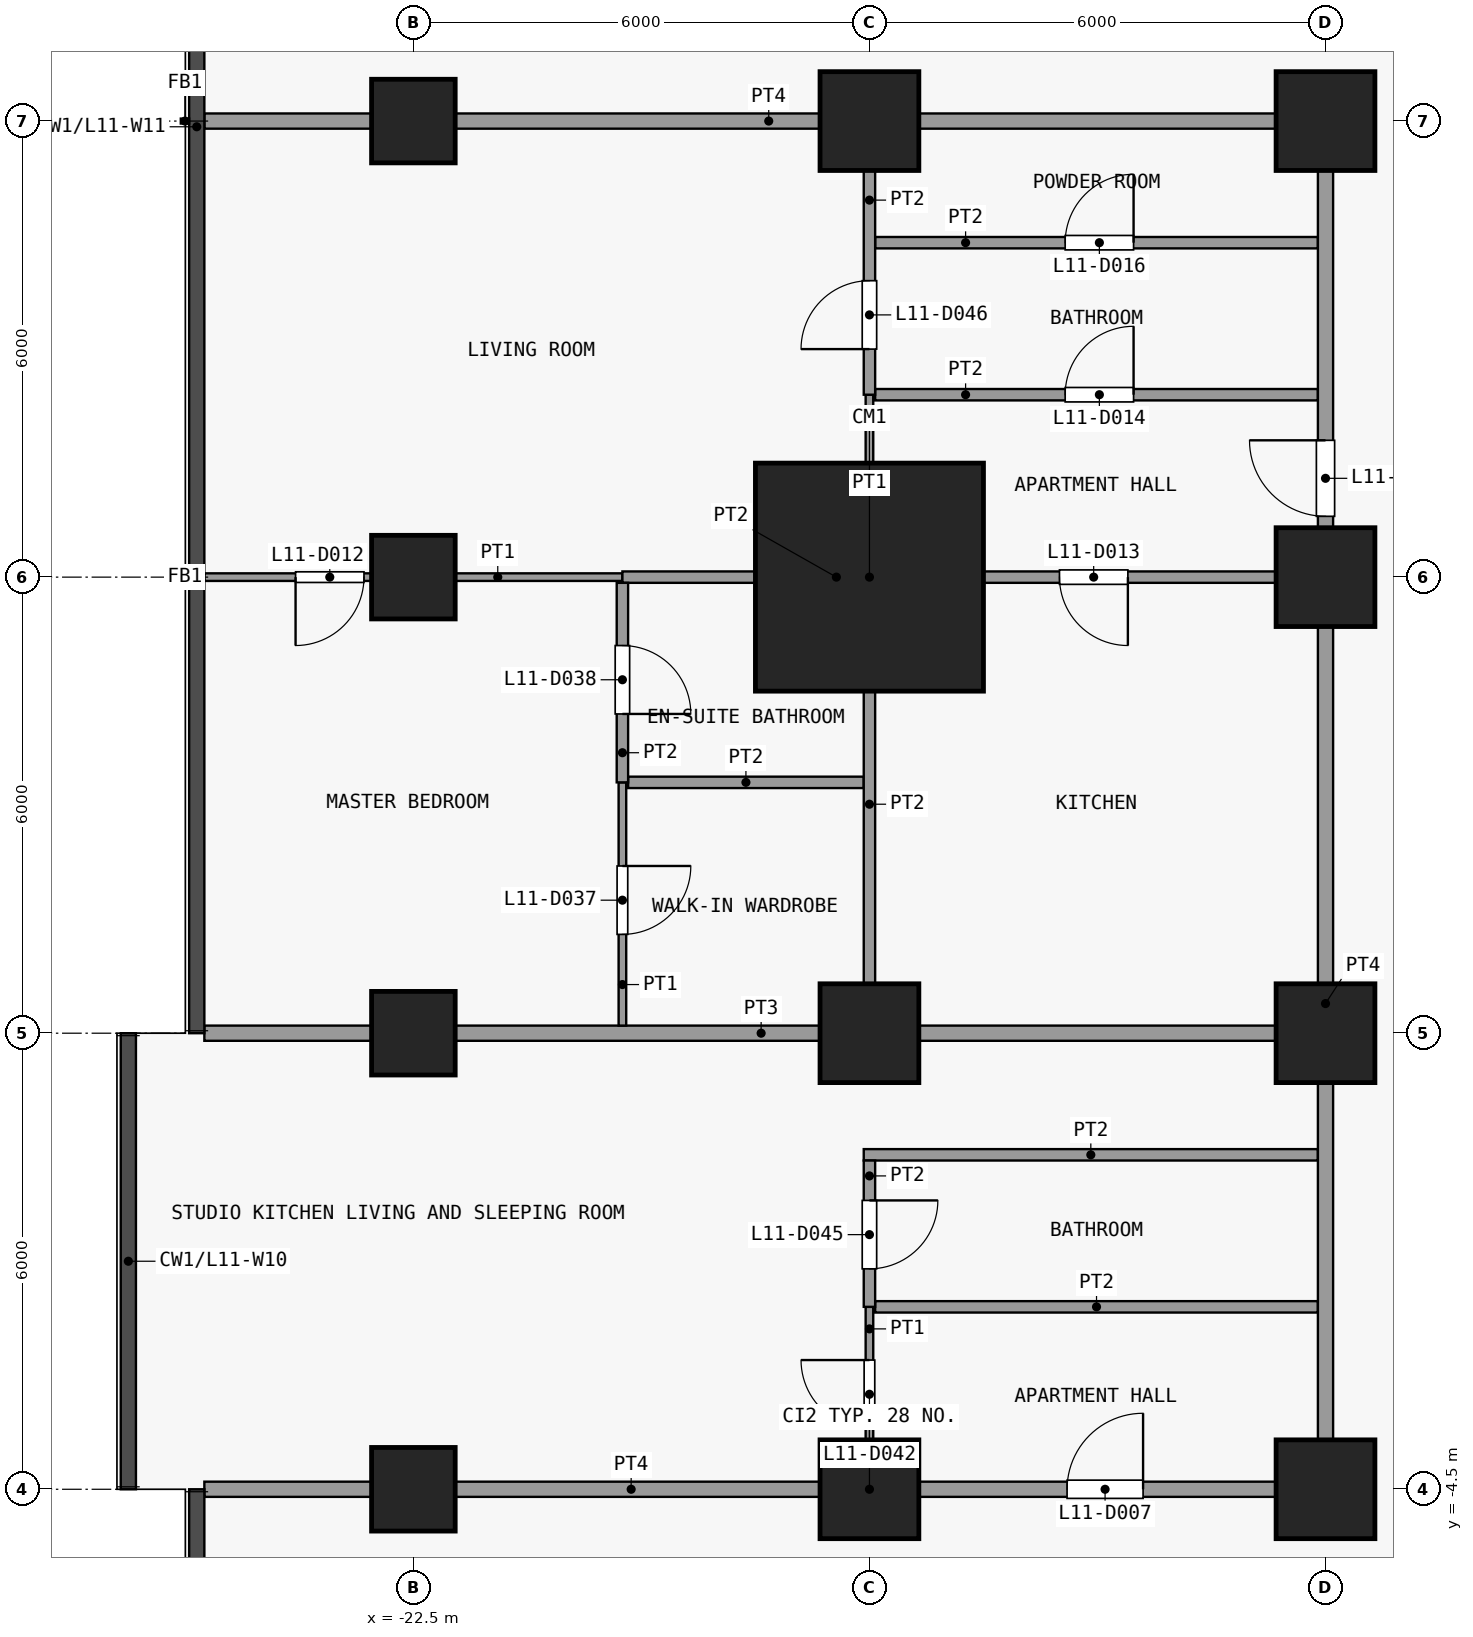
"""IFC4 building model, lengths in metres.
Left out: names, types, materials, properties, quantities, classifications, styles, units other than length and angle.
Written with IfcOpenShell. Run it as: python <this file> out.ifc"""

import sys

from ifc_helpers import new_model, si_unit, direction, frame, frame_2d, origin, origin_2d, place, context, subcontext, project, spatial, rectangle, extrude, element, fill, save


model = new_model("IFC4")
c1 = context("Model", 3, precision=1e-05, world=origin(), true_north=direction((0.0, 1.0)))
c2 = subcontext(c1, "Body", "Model", "MODEL_VIEW")
j1 = project(units=[si_unit("LENGTHUNIT", "METRE"), si_unit("PLANEANGLEUNIT", "RADIAN")], contexts=[c1])
p1 = place(None, origin())
s1 = spatial("IfcSite", under=j1, at=p1, CompositionType="ELEMENT")
p2 = place(p1, origin())
s2 = spatial("IfcBuilding", under=s1, at=p2, CompositionType="ELEMENT")
p3 = place(p2, frame((0.0, 0.0, 50.5)))
s3 = spatial("IfcBuildingStorey", under=s2, at=p3, CompositionType="ELEMENT", Elevation=50.5)
for number, where, z_axis, x_axis in (
    (1, (-22.5, -4.5, 0.0), (0.0, 0.0, 1.0), (1.0, 0.0, 0.0)),
    (2, (-22.5, 1.5, 0.0), (0.0, 0.0, 1.0), (1.0, 0.0, 0.0)),
    (3, (-22.5, 7.5, 0.0), (0.0, 0.0, 1.0), (1.0, 0.0, 0.0)),
    (4, (-22.5, 13.5, 0.0), (0.0, 0.0, 1.0), (1.0, 0.0, 0.0)),
):
    element("IfcColumn", number, at=place(p3, frame(where, z_axis=z_axis, x_axis=x_axis)), inside=s3, PredefinedType="COLUMN", context=c2, shape_type="SweptSolid", body=[
        extrude(rectangle(XDim=1.1, YDim=1.1, at=origin_2d()), origin(), (0.0, 0.0, 1.0), 3.6),
    ])
for number, where, z_axis, x_axis in (
    (5, (-16.5, -4.5, 0.0), (0.0, 0.0, 1.0), (1.0, 0.0, 0.0)),
    (6, (-16.5, 1.5, 0.0), (0.0, 0.0, 1.0), (1.0, 0.0, 0.0)),
):
    element("IfcColumn", number, at=place(p3, frame(where, z_axis=z_axis, x_axis=x_axis)), inside=s3, PredefinedType="COLUMN", context=c2, shape_type="SweptSolid", body=[
        extrude(rectangle(XDim=1.3, YDim=1.3, at=origin_2d()), origin(), (0.0, 0.0, 1.0), 3.6),
    ])
p4 = place(p3, frame((-16.5, 7.5, 0.0), z_axis=(0.0, 0.0, 1.0), x_axis=(1.0, 0.0, 0.0)))
e7 = element("IfcColumn", 7, at=p4, inside=s3, PredefinedType="COLUMN", context=c2, shape_type="SweptSolid", body=[
    extrude(rectangle(XDim=3.0, YDim=3.0, at=origin_2d()), origin(), (0.0, 0.0, 1.0), 3.6),
])
for number, where, z_axis, x_axis in (
    (8, (-16.5, 13.5, 0.0), (0.0, 0.0, 1.0), (1.0, 0.0, 0.0)),
    (9, (-10.5, -4.5, 0.0), (0.0, 0.0, 1.0), (1.0, 0.0, 0.0)),
    (10, (-10.5, 1.5, 0.0), (0.0, 0.0, 1.0), (1.0, 0.0, 0.0)),
    (11, (-10.5, 7.5, 0.0), (0.0, 0.0, 1.0), (1.0, 0.0, 0.0)),
    (12, (-10.5, 13.5, 0.0), (0.0, 0.0, 1.0), (1.0, 0.0, 0.0)),
):
    element("IfcColumn", number, at=place(p3, frame(where, z_axis=z_axis, x_axis=x_axis)), inside=s3, PredefinedType="COLUMN", context=c2, shape_type="SweptSolid", body=[
        extrude(rectangle(XDim=1.3, YDim=1.3, at=origin_2d()), origin(), (0.0, 0.0, 1.0), 3.6),
    ])
p5 = place(p3, frame((-25.25, -4.5, 0.0), z_axis=(0.0, 0.0, 1.0), x_axis=(1.0, 0.0, 0.0)))
e13 = element("IfcWall", 13, at=p5, inside=s3, PredefinedType="PARTITIONING", context=c2, shape_type="SweptSolid", body=[
    extrude(rectangle(XDim=14.85, YDim=0.2, at=frame_2d((7.425, 0.0))), origin(), (0.0, 0.0, 1.0), 3.3),
])
p6 = place(p5, frame((11.35, 0.0, 0.0)))
e14 = element("IfcOpeningElement", 14, at=p6, cuts=e13, PredefinedType="OPENING", context=c2, shape_type="SweptSolid", body=[
    extrude(rectangle(XDim=1.0, YDim=2.1, at=frame_2d((0.5, 1.05))), frame((0.0, 0.11, 0.0), z_axis=(0.0, -1.0, 0.0), x_axis=(1.0, 0.0, 0.0)), (0.0, 0.0, 1.0), 0.22),
])
p7 = place(p3, frame((-16.425, -2.1, 0.0), z_axis=(0.0, 0.0, 1.0), x_axis=(1.0, 0.0, 0.0)))
e15 = element("IfcWall", 15, at=p7, inside=s3, PredefinedType="PARTITIONING", context=c2, shape_type="SweptSolid", body=[
    extrude(rectangle(XDim=5.825, YDim=0.15, at=frame_2d((2.913, 0.0))), origin(), (0.0, 0.0, 1.0), 3.3),
])
p8 = place(p3, frame((-16.575, -0.1, 0.0), z_axis=(0.0, 0.0, 1.0), x_axis=(1.0, 0.0, 0.0)))
e16 = element("IfcWall", 16, at=p8, inside=s3, PredefinedType="PARTITIONING", context=c2, shape_type="SweptSolid", body=[
    extrude(rectangle(XDim=5.975, YDim=0.15, at=frame_2d((2.987, 0.0))), origin(), (0.0, 0.0, 1.0), 3.3),
])
p9 = place(p3, frame((-25.25, 1.5, 0.0), z_axis=(0.0, 0.0, 1.0), x_axis=(1.0, 0.0, 0.0)))
e17 = element("IfcWall", 17, at=p9, inside=s3, PredefinedType="PARTITIONING", context=c2, shape_type="SweptSolid", body=[
    extrude(rectangle(XDim=14.65, YDim=0.2, at=frame_2d((7.325, 0.0))), origin(), (0.0, 0.0, 1.0), 3.3),
])
p10 = place(p3, frame((-19.675, 4.8, 0.0), z_axis=(0.0, 0.0, 1.0), x_axis=(1.0, 0.0, 0.0)))
e18 = element("IfcWall", 18, at=p10, inside=s3, PredefinedType="PARTITIONING", context=c2, shape_type="SweptSolid", body=[
    extrude(rectangle(XDim=3.1, YDim=0.15, at=frame_2d((1.55, 0.0))), origin(), (0.0, 0.0, 1.0), 3.3),
])
p11 = place(p3, frame((-25.25, 7.5, 0.0), z_axis=(0.0, 0.0, 1.0), x_axis=(1.0, 0.0, 0.0)))
e19 = element("IfcWall", 19, at=p11, inside=s3, PredefinedType="PARTITIONING", context=c2, shape_type="SweptSolid", body=[
    extrude(rectangle(XDim=5.5, YDim=0.1, at=frame_2d((2.75, 0.0))), origin(), (0.0, 0.0, 1.0), 3.3),
])
p12 = place(p11, frame((1.2, 0.0, 0.0)))
e20 = element("IfcOpeningElement", 20, at=p12, cuts=e19, PredefinedType="OPENING", context=c2, shape_type="SweptSolid", body=[
    extrude(rectangle(XDim=0.9, YDim=2.1, at=frame_2d((0.45, 1.05))), frame((0.0, 0.06, 0.0), z_axis=(0.0, -1.0, 0.0), x_axis=(1.0, 0.0, 0.0)), (0.0, 0.0, 1.0), 0.12),
])
p13 = place(p3, frame((-19.75, 7.5, 0.0), z_axis=(0.0, 0.0, 1.0), x_axis=(1.0, 0.0, 0.0)))
e21 = element("IfcWall", 21, at=p13, inside=s3, PredefinedType="PARTITIONING", context=c2, shape_type="SweptSolid", body=[
    extrude(rectangle(XDim=9.15, YDim=0.15, at=frame_2d((4.575, 0.0))), origin(), (0.0, 0.0, 1.0), 3.3),
])
p14 = place(p13, frame((5.75, 0.0, 0.0)))
e22 = element("IfcOpeningElement", 22, at=p14, cuts=e21, PredefinedType="OPENING", context=c2, shape_type="SweptSolid", body=[
    extrude(rectangle(XDim=0.9, YDim=2.1, at=frame_2d((0.45, 1.05))), frame((0.0, 0.085, 0.0), z_axis=(0.0, -1.0, 0.0), x_axis=(1.0, 0.0, 0.0)), (0.0, 0.0, 1.0), 0.17),
])
p15 = place(p3, frame((-16.425, 9.9, 0.0), z_axis=(0.0, 0.0, 1.0), x_axis=(1.0, 0.0, 0.0)))
e23 = element("IfcWall", 23, at=p15, inside=s3, PredefinedType="PARTITIONING", context=c2, shape_type="SweptSolid", body=[
    extrude(rectangle(XDim=5.825, YDim=0.15, at=frame_2d((2.913, 0.0))), origin(), (0.0, 0.0, 1.0), 3.3),
])
p16 = place(p15, frame((2.5, 0.0, 0.0)))
e24 = element("IfcOpeningElement", 24, at=p16, cuts=e23, PredefinedType="OPENING", context=c2, shape_type="SweptSolid", body=[
    extrude(rectangle(XDim=0.9, YDim=2.1, at=frame_2d((0.45, 1.05))), frame((0.0, 0.085, 0.0), z_axis=(0.0, -1.0, 0.0), x_axis=(1.0, 0.0, 0.0)), (0.0, 0.0, 1.0), 0.17),
])
p17 = place(p3, frame((-16.425, 11.9, 0.0), z_axis=(0.0, 0.0, 1.0), x_axis=(1.0, 0.0, 0.0)))
e25 = element("IfcWall", 25, at=p17, inside=s3, PredefinedType="PARTITIONING", context=c2, shape_type="SweptSolid", body=[
    extrude(rectangle(XDim=5.825, YDim=0.15, at=frame_2d((2.913, 0.0))), origin(), (0.0, 0.0, 1.0), 3.3),
])
p18 = place(p17, frame((2.5, 0.0, 0.0)))
e26 = element("IfcOpeningElement", 26, at=p18, cuts=e25, PredefinedType="OPENING", context=c2, shape_type="SweptSolid", body=[
    extrude(rectangle(XDim=0.9, YDim=2.1, at=frame_2d((0.45, 1.05))), frame((0.0, 0.085, 0.0), z_axis=(0.0, -1.0, 0.0), x_axis=(1.0, 0.0, 0.0)), (0.0, 0.0, 1.0), 0.17),
])
p19 = place(p3, frame((-25.25, 13.5, 0.0), z_axis=(0.0, 0.0, 1.0), x_axis=(1.0, 0.0, 0.0)))
e27 = element("IfcWall", 27, at=p19, inside=s3, PredefinedType="PARTITIONING", context=c2, shape_type="SweptSolid", body=[
    extrude(rectangle(XDim=14.85, YDim=0.2, at=frame_2d((7.425, 0.0))), origin(), (0.0, 0.0, 1.0), 3.3),
])
p20 = place(p3, frame((-19.75, 1.6, 0.0), z_axis=(0.0, 0.0, 1.0), x_axis=(0.0, 1.0, 0.0)))
e28 = element("IfcWall", 28, at=p20, inside=s3, PredefinedType="PARTITIONING", context=c2, shape_type="SweptSolid", body=[
    extrude(rectangle(XDim=3.2, YDim=0.1, at=frame_2d((1.6, 0.0))), origin(), (0.0, 0.0, 1.0), 3.3),
])
p21 = place(p20, frame((1.2, 0.0, 0.0)))
e29 = element("IfcOpeningElement", 29, at=p21, cuts=e28, PredefinedType="OPENING", context=c2, shape_type="SweptSolid", body=[
    extrude(rectangle(XDim=0.9, YDim=2.1, at=frame_2d((0.45, 1.05))), frame((0.0, 0.06, 0.0), z_axis=(0.0, -1.0, 0.0), x_axis=(1.0, 0.0, 0.0)), (0.0, 0.0, 1.0), 0.12),
])
p22 = place(p3, frame((-19.75, 4.8, 0.0), z_axis=(0.0, 0.0, 1.0), x_axis=(0.0, 1.0, 0.0)))
e30 = element("IfcWall", 30, at=p22, inside=s3, PredefinedType="PARTITIONING", context=c2, shape_type="SweptSolid", body=[
    extrude(rectangle(XDim=2.625, YDim=0.15, at=frame_2d((1.312, 0.0))), origin(), (0.0, 0.0, 1.0), 3.3),
])
p23 = place(p22, frame((0.9, 0.0, 0.0)))
e31 = element("IfcOpeningElement", 31, at=p23, cuts=e30, PredefinedType="OPENING", context=c2, shape_type="SweptSolid", body=[
    extrude(rectangle(XDim=0.9, YDim=2.1, at=frame_2d((0.45, 1.05))), frame((0.0, 0.085, 0.0), z_axis=(0.0, -1.0, 0.0), x_axis=(1.0, 0.0, 0.0)), (0.0, 0.0, 1.0), 0.17),
])
p24 = place(p3, frame((-16.5, -4.4, 0.0), z_axis=(0.0, 0.0, 1.0), x_axis=(0.0, 1.0, 0.0)))
e32 = element("IfcWall", 32, at=p24, inside=s3, PredefinedType="PARTITIONING", context=c2, shape_type="SweptSolid", body=[
    extrude(rectangle(XDim=2.3, YDim=0.1, at=frame_2d((1.15, 0.0))), origin(), (0.0, 0.0, 1.0), 3.3),
])
p25 = place(p24, frame((0.7, 0.0, 0.0)))
e33 = element("IfcOpeningElement", 33, at=p25, cuts=e32, PredefinedType="OPENING", context=c2, shape_type="SweptSolid", body=[
    extrude(rectangle(XDim=0.9, YDim=2.1, at=frame_2d((0.45, 1.05))), frame((0.0, 0.06, 0.0), z_axis=(0.0, -1.0, 0.0), x_axis=(1.0, 0.0, 0.0)), (0.0, 0.0, 1.0), 0.12),
])
p26 = place(p3, frame((-16.5, 7.575, 0.0), z_axis=(0.0, 0.0, 1.0), x_axis=(0.0, 1.0, 0.0)))
e34 = element("IfcWall", 34, at=p26, inside=s3, PredefinedType="PARTITIONING", context=c2, shape_type="SweptSolid", body=[
    extrude(rectangle(XDim=2.325, YDim=0.1, at=frame_2d((1.163, 0.0))), origin(), (0.0, 0.0, 1.0), 3.3),
])
p27 = place(p3, frame((-16.5, -2.1, 0.0), z_axis=(0.0, 0.0, 1.0), x_axis=(0.0, 1.0, 0.0)))
e35 = element("IfcWall", 35, at=p27, inside=s3, PredefinedType="PARTITIONING", context=c2, shape_type="SweptSolid", body=[
    extrude(rectangle(XDim=1.925, YDim=0.15, at=frame_2d((0.962, 0.0))), origin(), (0.0, 0.0, 1.0), 3.3),
])
p28 = place(p27, frame((0.5, 0.0, 0.0)))
e36 = element("IfcOpeningElement", 36, at=p28, cuts=e35, PredefinedType="OPENING", context=c2, shape_type="SweptSolid", body=[
    extrude(rectangle(XDim=0.9, YDim=2.1, at=frame_2d((0.45, 1.05))), frame((0.0, 0.085, 0.0), z_axis=(0.0, -1.0, 0.0), x_axis=(1.0, 0.0, 0.0)), (0.0, 0.0, 1.0), 0.17),
])
p29 = place(p3, frame((-16.5, 1.6, 0.0), z_axis=(0.0, 0.0, 1.0), x_axis=(0.0, 1.0, 0.0)))
e37 = element("IfcWall", 37, at=p29, inside=s3, PredefinedType="PARTITIONING", context=c2, shape_type="SweptSolid", body=[
    extrude(rectangle(XDim=5.825, YDim=0.15, at=frame_2d((2.913, 0.0))), origin(), (0.0, 0.0, 1.0), 3.3),
])
p30 = place(p3, frame((-16.5, 9.9, 0.0), z_axis=(0.0, 0.0, 1.0), x_axis=(0.0, 1.0, 0.0)))
e38 = element("IfcWall", 38, at=p30, inside=s3, PredefinedType="PARTITIONING", context=c2, shape_type="SweptSolid", body=[
    extrude(rectangle(XDim=3.5, YDim=0.15, at=frame_2d((1.75, 0.0))), origin(), (0.0, 0.0, 1.0), 3.3),
])
p31 = place(p30, frame((0.6, 0.0, 0.0)))
e39 = element("IfcOpeningElement", 39, at=p31, cuts=e38, PredefinedType="OPENING", context=c2, shape_type="SweptSolid", body=[
    extrude(rectangle(XDim=0.9, YDim=2.1, at=frame_2d((0.45, 1.05))), frame((0.0, 0.085, 0.0), z_axis=(0.0, -1.0, 0.0), x_axis=(1.0, 0.0, 0.0)), (0.0, 0.0, 1.0), 0.17),
])
p32 = place(p3, frame((-10.5, -4.4, 0.0), z_axis=(0.0, 0.0, 1.0), x_axis=(0.0, 1.0, 0.0)))
e40 = element("IfcWall", 40, at=p32, inside=s3, PredefinedType="PARTITIONING", context=c2, shape_type="SweptSolid", body=[
    extrude(rectangle(XDim=17.8, YDim=0.2, at=frame_2d((8.9, 0.0))), origin(), (0.0, 0.0, 1.0), 3.3),
])
p33 = place(p32, frame((12.7, 0.0, 0.0)))
e41 = element("IfcOpeningElement", 41, at=p33, cuts=e40, PredefinedType="OPENING", context=c2, shape_type="SweptSolid", body=[
    extrude(rectangle(XDim=1.0, YDim=2.1, at=frame_2d((0.5, 1.05))), frame((0.0, 0.11, 0.0), z_axis=(0.0, -1.0, 0.0), x_axis=(1.0, 0.0, 0.0)), (0.0, 0.0, 1.0), 0.22),
])
p34 = place(p6, origin())
e42 = element("IfcDoor", 42, at=p34, inside=s3, OperationType="SINGLE_SWING_LEFT", PredefinedType="DOOR", context=c2, shape_type="SweptSolid", body=[
    extrude(rectangle(XDim=1.0, YDim=2.1, at=frame_2d((0.5, 1.05))), frame((0.0, 0.025, 0.0), z_axis=(0.0, -1.0, 0.0), x_axis=(1.0, 0.0, 0.0)), (0.0, 0.0, 1.0), 0.05),
])
fill(e14, e42)
p35 = place(p12, origin())
e43 = element("IfcDoor", 43, at=p35, inside=s3, OperationType="SINGLE_SWING_LEFT", PredefinedType="DOOR", context=c2, shape_type="SweptSolid", body=[
    extrude(rectangle(XDim=0.9, YDim=2.1, at=frame_2d((0.45, 1.05))), frame((0.0, 0.025, 0.0), z_axis=(0.0, -1.0, 0.0), x_axis=(1.0, 0.0, 0.0)), (0.0, 0.0, 1.0), 0.05),
])
fill(e20, e43)
p36 = place(p14, origin())
e44 = element("IfcDoor", 44, at=p36, inside=s3, OperationType="SINGLE_SWING_RIGHT", PredefinedType="DOOR", context=c2, shape_type="SweptSolid", body=[
    extrude(rectangle(XDim=0.9, YDim=2.1, at=frame_2d((0.45, 1.05))), frame((0.0, 0.025, 0.0), z_axis=(0.0, -1.0, 0.0), x_axis=(1.0, 0.0, 0.0)), (0.0, 0.0, 1.0), 0.05),
])
fill(e22, e44)
p37 = place(p16, origin())
e45 = element("IfcDoor", 45, at=p37, inside=s3, OperationType="SINGLE_SWING_LEFT", PredefinedType="DOOR", context=c2, shape_type="SweptSolid", body=[
    extrude(rectangle(XDim=0.9, YDim=2.1, at=frame_2d((0.45, 1.05))), frame((0.0, 0.025, 0.0), z_axis=(0.0, -1.0, 0.0), x_axis=(1.0, 0.0, 0.0)), (0.0, 0.0, 1.0), 0.05),
])
fill(e24, e45)
p38 = place(p18, origin())
e46 = element("IfcDoor", 46, at=p38, inside=s3, OperationType="SINGLE_SWING_LEFT", PredefinedType="DOOR", context=c2, shape_type="SweptSolid", body=[
    extrude(rectangle(XDim=0.9, YDim=2.1, at=frame_2d((0.45, 1.05))), frame((0.0, 0.025, 0.0), z_axis=(0.0, -1.0, 0.0), x_axis=(1.0, 0.0, 0.0)), (0.0, 0.0, 1.0), 0.05),
])
fill(e26, e46)
p39 = place(p21, origin())
e47 = element("IfcDoor", 47, at=p39, inside=s3, OperationType="SINGLE_SWING_RIGHT", PredefinedType="DOOR", context=c2, shape_type="SweptSolid", body=[
    extrude(rectangle(XDim=0.9, YDim=2.1, at=frame_2d((0.45, 1.05))), frame((0.0, 0.025, 0.0), z_axis=(0.0, -1.0, 0.0), x_axis=(1.0, 0.0, 0.0)), (0.0, 0.0, 1.0), 0.05),
])
fill(e29, e47)
p40 = place(p23, origin())
e48 = element("IfcDoor", 48, at=p40, inside=s3, OperationType="SINGLE_SWING_LEFT", PredefinedType="DOOR", context=c2, shape_type="SweptSolid", body=[
    extrude(rectangle(XDim=0.9, YDim=2.1, at=frame_2d((0.45, 1.05))), frame((0.0, 0.025, 0.0), z_axis=(0.0, -1.0, 0.0), x_axis=(1.0, 0.0, 0.0)), (0.0, 0.0, 1.0), 0.05),
])
fill(e31, e48)
p41 = place(p25, origin())
e49 = element("IfcDoor", 49, at=p41, inside=s3, OperationType="SINGLE_SWING_LEFT", PredefinedType="DOOR", context=c2, shape_type="SweptSolid", body=[
    extrude(rectangle(XDim=0.9, YDim=2.1, at=frame_2d((0.45, 1.05))), frame((0.0, 0.025, 0.0), z_axis=(0.0, -1.0, 0.0), x_axis=(1.0, 0.0, 0.0)), (0.0, 0.0, 1.0), 0.05),
])
fill(e33, e49)
p42 = place(p28, origin())
e50 = element("IfcDoor", 50, at=p42, inside=s3, OperationType="SINGLE_SWING_RIGHT", PredefinedType="DOOR", context=c2, shape_type="SweptSolid", body=[
    extrude(rectangle(XDim=0.9, YDim=2.1, at=frame_2d((0.45, 1.05))), frame((0.0, 0.025, 0.0), z_axis=(0.0, -1.0, 0.0), x_axis=(1.0, 0.0, 0.0)), (0.0, 0.0, 1.0), 0.05),
])
fill(e36, e50)
p43 = place(p31, origin())
e51 = element("IfcDoor", 51, at=p43, inside=s3, OperationType="SINGLE_SWING_RIGHT", PredefinedType="DOOR", context=c2, shape_type="SweptSolid", body=[
    extrude(rectangle(XDim=0.9, YDim=2.1, at=frame_2d((0.45, 1.05))), frame((0.0, 0.025, 0.0), z_axis=(0.0, -1.0, 0.0), x_axis=(1.0, 0.0, 0.0)), (0.0, 0.0, 1.0), 0.05),
])
fill(e39, e51)
p44 = place(p33, origin())
e52 = element("IfcDoor", 52, at=p44, inside=s3, OperationType="SINGLE_SWING_LEFT", PredefinedType="DOOR", context=c2, shape_type="SweptSolid", body=[
    extrude(rectangle(XDim=1.0, YDim=2.1, at=frame_2d((0.5, 1.05))), frame((0.0, 0.025, 0.0), z_axis=(0.0, -1.0, 0.0), x_axis=(1.0, 0.0, 0.0)), (0.0, 0.0, 1.0), 0.05),
])
fill(e41, e52)
save(model, sys.argv[1])
